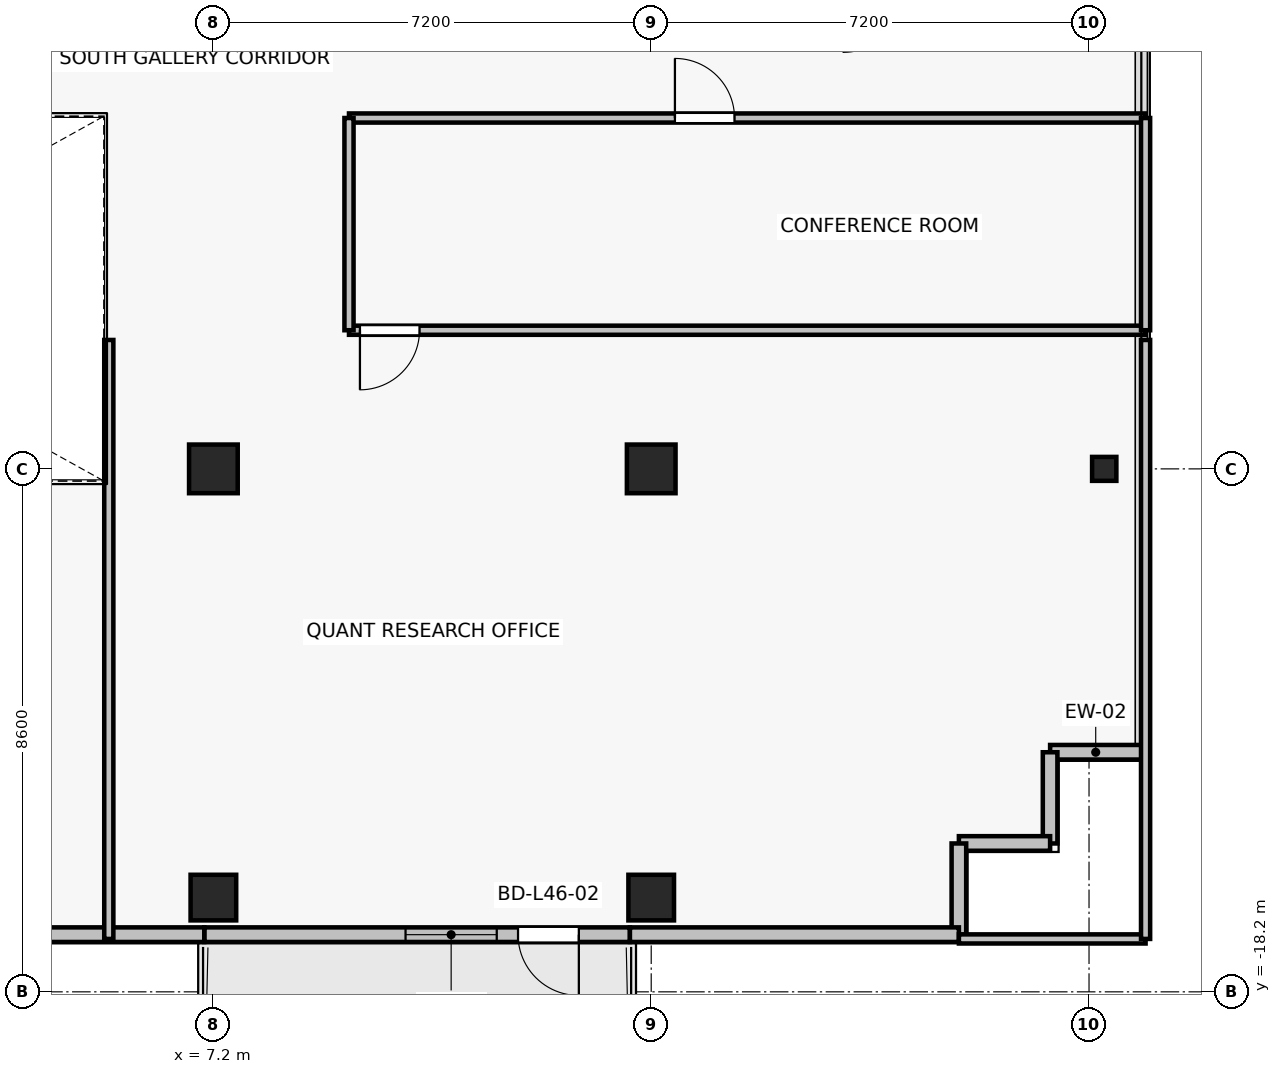
"""IFC4 building model, lengths in metres.
Left out: names, types, materials, properties, quantities, classifications, styles, units other than length and angle.
Written with IfcOpenShell. Run it as: python <this file> out.ifc"""

import sys

from ifc_helpers import new_model, si_unit, direction, frame, frame_2d, origin, origin_2d, place, context, subcontext, project, spatial, rectangle, i_section, extrude, source, transform, mapped, element, fill, save


model = new_model("IFC4")
c1 = context("Model", 3, precision=1e-05, world=origin(), true_north=direction((0.0, 1.0)))
c2 = subcontext(c1, "Body", "Model", "MODEL_VIEW")
j1 = project(units=[si_unit("LENGTHUNIT", "METRE"), si_unit("PLANEANGLEUNIT", "RADIAN")], contexts=[c1])
p1 = place(None, origin())
s1 = spatial("IfcSite", under=j1, at=p1, CompositionType="ELEMENT")
p2 = place(p1, origin())
s2 = spatial("IfcBuilding", under=s1, at=p2, CompositionType="ELEMENT")
p3 = place(p2, frame((0.0, 0.0, 166.0)))
s3 = spatial("IfcBuildingStorey", under=s2, at=p3, CompositionType="ELEMENT", Elevation=166.0)
for number, where, z_axis, x_axis in (
    (1, (7.2, -9.6, 0.0), (0.0, 0.0, 1.0), (1.0, 0.0, 0.0)),
    (2, (14.4, -9.6, 0.0), (0.0, 0.0, 1.0), (1.0, 0.0, 0.0)),
):
    element("IfcColumn", number, at=place(p3, frame(where, z_axis=z_axis, x_axis=x_axis)), inside=s3, PredefinedType="COLUMN", context=c2, shape_type="SweptSolid", body=[
        extrude(rectangle(XDim=0.8, YDim=0.8, at=origin_2d()), origin(), (0.0, 0.0, 1.0), 3.3),
    ])
for number, where, z_axis, x_axis in (
    (3, (7.2, -16.65, 0.0), (0.0, 0.0, 1.0), (1.0, 0.0, 0.0)),
    (4, (14.4, -16.65, 0.0), (0.0, 0.0, 1.0), (1.0, 0.0, 0.0)),
):
    element("IfcColumn", number, at=place(p3, frame(where, z_axis=z_axis, x_axis=x_axis)), inside=s3, PredefinedType="COLUMN", context=c2, shape_type="SweptSolid", body=[
        extrude(rectangle(XDim=0.75, YDim=0.75, at=origin_2d()), origin(), (0.0, 0.0, 1.0), 3.3),
    ])
p4 = place(p3, frame((21.85, -9.6, 0.0), z_axis=(0.0, 0.0, 1.0), x_axis=(1.0, 0.0, 0.0)))
e5 = element("IfcColumn", 5, at=p4, inside=s3, PredefinedType="COLUMN", context=c2, shape_type="SweptSolid", body=[
    extrude(i_section(OverallWidth=0.399, OverallDepth=0.394, WebThickness=0.023, FlangeThickness=0.037, FilletRadius=0.015, at=origin_2d()), origin(), (0.0, 0.0, 1.0), 3.3),
])
p5 = place(p3, frame((14.05, -17.26, 0.0), z_axis=(0.0, 0.0, 1.0), x_axis=(-1.0, 0.0, 0.0)))
e6 = element("IfcWall", 6, at=p5, inside=s3, PredefinedType="SOLIDWALL", context=c2, shape_type="SweptSolid", body=[
    extrude(rectangle(XDim=7.0, YDim=0.24, at=frame_2d((3.5, 0.0))), origin(), (0.0, 0.0, 1.0), 2.665),
])
p6 = place(p5, frame((0.84, 0.0, 0.0)))
e7 = element("IfcOpeningElement", 7, at=p6, cuts=e6, PredefinedType="OPENING", context=c2, shape_type="SweptSolid", body=[
    extrude(rectangle(XDim=1.0, YDim=2.2, at=frame_2d((0.5, 1.1))), frame((0.0, 0.13, 0.0), z_axis=(0.0, -1.0, 0.0), x_axis=(1.0, 0.0, 0.0)), (0.0, 0.0, 1.0), 0.26),
])
p7 = place(p5, frame((2.19, 0.0, 0.85)))
e8 = element("IfcOpeningElement", 8, at=p7, cuts=e6, PredefinedType="OPENING", context=c2, shape_type="SweptSolid", body=[
    extrude(rectangle(XDim=1.5, YDim=1.6, at=frame_2d((0.75, 0.8))), frame((0.0, 0.13, 0.0), z_axis=(0.0, -1.0, 0.0), x_axis=(1.0, 0.0, 0.0)), (0.0, 0.0, 1.0), 0.26),
])
for number, where, z_axis, x_axis in (
    (9, (20.96, -14.26, 0.0), (0.0, 0.0, 1.0), (1.0, 0.0, 0.0)),
    (10, (20.96, -15.76, 0.0), (0.0, 0.0, 1.0), (0.0, 1.0, 0.0)),
    (11, (19.46, -15.76, 0.0), (0.0, 0.0, 1.0), (1.0, 0.0, 0.0)),
    (12, (19.46, -17.26, 0.0), (0.0, 0.0, 1.0), (0.0, 1.0, 0.0)),
):
    element("IfcWall", number, at=place(p3, frame(where, z_axis=z_axis, x_axis=x_axis)), inside=s3, PredefinedType="SOLIDWALL", context=c2, shape_type="SweptSolid", body=[
        extrude(rectangle(XDim=1.5, YDim=0.24, at=frame_2d((0.75, 0.0))), origin(), (0.0, 0.0, 1.0), 3.075),
    ])
p8 = place(p3, frame((14.05, -17.26, 0.0), z_axis=(0.0, 0.0, 1.0), x_axis=(1.0, 0.0, 0.0)))
e13 = element("IfcWall", 13, at=p8, inside=s3, PredefinedType="SOLIDWALL", context=c2, shape_type="SweptSolid", body=[
    extrude(rectangle(XDim=5.41, YDim=0.24, at=frame_2d((2.705, 0.0))), origin(), (0.0, 0.0, 1.0), 3.075),
])
p9 = place(p3, frame((3.2, -17.26, 0.0), z_axis=(0.0, 0.0, 1.0), x_axis=(1.0, 0.0, 0.0)))
e14 = element("IfcWall", 14, at=p9, inside=s3, PredefinedType="SOLIDWALL", context=c2, shape_type="SweptSolid", body=[
    extrude(rectangle(XDim=3.85, YDim=0.24, at=frame_2d((1.925, 0.0))), origin(), (0.0, 0.0, 1.0), 3.075),
])
p10 = place(p3, frame((22.53, -7.32, 0.0), z_axis=(0.0, 0.0, 1.0), x_axis=(-1.0, 0.0, 0.0)))
e15 = element("IfcWall", 15, at=p10, inside=s3, PredefinedType="PARTITIONING", context=c2, shape_type="SweptSolid", body=[
    extrude(rectangle(XDim=13.1, YDim=0.15, at=frame_2d((6.55, 0.0))), origin(), (0.0, 0.0, 1.0), 2.565),
])
p11 = place(p10, frame((11.94, 0.0, 0.0)))
e16 = element("IfcOpeningElement", 16, at=p11, cuts=e15, PredefinedType="OPENING", context=c2, shape_type="SweptSolid", body=[
    extrude(rectangle(XDim=0.98, YDim=2.15, at=frame_2d((0.49, 1.075))), frame((0.0, 0.085, 0.0), z_axis=(0.0, -1.0, 0.0), x_axis=(1.0, 0.0, 0.0)), (0.0, 0.0, 1.0), 0.17),
])
p12 = place(p3, frame((9.43, -3.83, 0.0), z_axis=(0.0, 0.0, 1.0), x_axis=(1.0, 0.0, 0.0)))
e17 = element("IfcWall", 17, at=p12, inside=s3, PredefinedType="PARTITIONING", context=c2, shape_type="SweptSolid", body=[
    extrude(rectangle(XDim=13.1, YDim=0.15, at=frame_2d((6.55, 0.0))), origin(), (0.0, 0.0, 1.0), 2.565),
])
p13 = place(p12, frame((5.36, 0.0, 0.0)))
e18 = element("IfcOpeningElement", 18, at=p13, cuts=e17, PredefinedType="OPENING", context=c2, shape_type="SweptSolid", body=[
    extrude(rectangle(XDim=0.98, YDim=2.15, at=frame_2d((0.49, 1.075))), frame((0.0, 0.085, 0.0), z_axis=(0.0, -1.0, 0.0), x_axis=(1.0, 0.0, 0.0)), (0.0, 0.0, 1.0), 0.17),
])
p14 = place(p3, frame((9.43, -7.32, 0.0), z_axis=(0.0, 0.0, 1.0), x_axis=(0.0, 1.0, 0.0)))
e19 = element("IfcWall", 19, at=p14, inside=s3, PredefinedType="PARTITIONING", context=c2, shape_type="SweptSolid", body=[
    extrude(rectangle(XDim=3.49, YDim=0.15, at=frame_2d((1.745, 0.0))), origin(), (0.0, 0.0, 1.0), 2.665),
])
p15 = place(p3, frame((22.53, -3.83, 0.0), z_axis=(0.0, 0.0, 1.0), x_axis=(0.0, -1.0, 0.0)))
e20 = element("IfcWall", 20, at=p15, inside=s3, PredefinedType="PARTITIONING", context=c2, shape_type="SweptSolid", body=[
    extrude(rectangle(XDim=3.49, YDim=0.15, at=frame_2d((1.745, 0.0))), origin(), (0.0, 0.0, 1.0), 3.075),
])
p16 = place(p3, frame((22.53, -17.33, 0.0), z_axis=(0.0, 0.0, 1.0), x_axis=(-1.0, 0.0, 0.0)))
e21 = element("IfcWall", 21, at=p16, inside=s3, PredefinedType="PARTITIONING", context=c2, shape_type="SweptSolid", body=[
    extrude(rectangle(XDim=3.07, YDim=0.15, at=frame_2d((1.535, 0.0))), origin(), (0.0, 0.0, 1.0), 2.665),
])
p17 = place(p3, frame((5.48, -17.33, 0.0), z_axis=(0.0, 0.0, 1.0), x_axis=(0.0, 1.0, 0.0)))
e22 = element("IfcWall", 22, at=p17, inside=s3, PredefinedType="PARTITIONING", context=c2, shape_type="SweptSolid", body=[
    extrude(rectangle(XDim=9.85, YDim=0.15, at=frame_2d((4.925, 0.0))), origin(), (0.0, 0.0, 1.0), 2.565),
])
p18 = place(p3, frame((22.53, -7.48, 0.0), z_axis=(0.0, 0.0, 1.0), x_axis=(0.0, -1.0, 0.0)))
e23 = element("IfcWall", 23, at=p18, inside=s3, PredefinedType="PARTITIONING", context=c2, shape_type="SweptSolid", body=[
    extrude(rectangle(XDim=9.85, YDim=0.15, at=frame_2d((4.925, 0.0))), origin(), (0.0, 0.0, 1.0), 2.665),
])
m1 = source(origin(), c2, "Body", "SweptSolid", [
    extrude(rectangle(XDim=1.0, YDim=2.2, at=frame_2d((0.5, 1.1))), frame((0.0, 0.025, 0.0), z_axis=(0.0, -1.0, 0.0), x_axis=(1.0, 0.0, 0.0)), (0.0, 0.0, 1.0), 0.05),
])
p19 = place(p6, origin())
e24 = element("IfcDoor", 24, at=p19, inside=s3, OperationType="SINGLE_SWING_LEFT", PredefinedType="DOOR", context=c2, shape_type="MappedRepresentation", body=[
    mapped(m1, transform((0.0, 0.0, 0.0), x_axis=(1.0, 0.0, 0.0), y_axis=(0.0, 1.0, 0.0), z_axis=(0.0, 0.0, 1.0), scale=1.0)),
])
fill(e7, e24)
m2 = source(origin(), c2, "Body", "SweptSolid", [
    extrude(rectangle(XDim=1.5, YDim=1.6, at=frame_2d((0.75, 0.8))), frame((0.0, 0.03, 0.0), z_axis=(0.0, -1.0, 0.0), x_axis=(1.0, 0.0, 0.0)), (0.0, 0.0, 1.0), 0.06),
])
p20 = place(p7, origin())
e25 = element("IfcWindow", 25, at=p20, inside=s3, PartitioningType="SINGLE_PANEL", PredefinedType="WINDOW", context=c2, shape_type="MappedRepresentation", body=[
    mapped(m2, transform((0.0, 0.0, 0.0), x_axis=(1.0, 0.0, 0.0), y_axis=(0.0, 1.0, 0.0), z_axis=(0.0, 0.0, 1.0), scale=1.0)),
])
fill(e8, e25)
m3 = source(origin(), c2, "Body", "SweptSolid", [
    extrude(rectangle(XDim=0.98, YDim=2.15, at=frame_2d((0.49, 1.075))), frame((0.0, 0.025, 0.0), z_axis=(0.0, -1.0, 0.0), x_axis=(1.0, 0.0, 0.0)), (0.0, 0.0, 1.0), 0.05),
])
p21 = place(p13, origin())
e26 = element("IfcDoor", 26, at=p21, inside=s3, OperationType="SINGLE_SWING_LEFT", PredefinedType="DOOR", context=c2, shape_type="MappedRepresentation", body=[
    mapped(m3, transform((0.0, 0.0, 0.0), x_axis=(1.0, 0.0, 0.0), y_axis=(0.0, 1.0, 0.0), z_axis=(0.0, 0.0, 1.0), scale=1.0)),
])
fill(e18, e26)
p22 = place(p11, origin())
e27 = element("IfcDoor", 27, at=p22, inside=s3, OperationType="SINGLE_SWING_RIGHT", PredefinedType="DOOR", context=c2, shape_type="MappedRepresentation", body=[
    mapped(m3, transform((0.0, 0.0, 0.0), x_axis=(1.0, 0.0, 0.0), y_axis=(0.0, 1.0, 0.0), z_axis=(0.0, 0.0, 1.0), scale=1.0)),
])
fill(e16, e27)
save(model, sys.argv[1])
